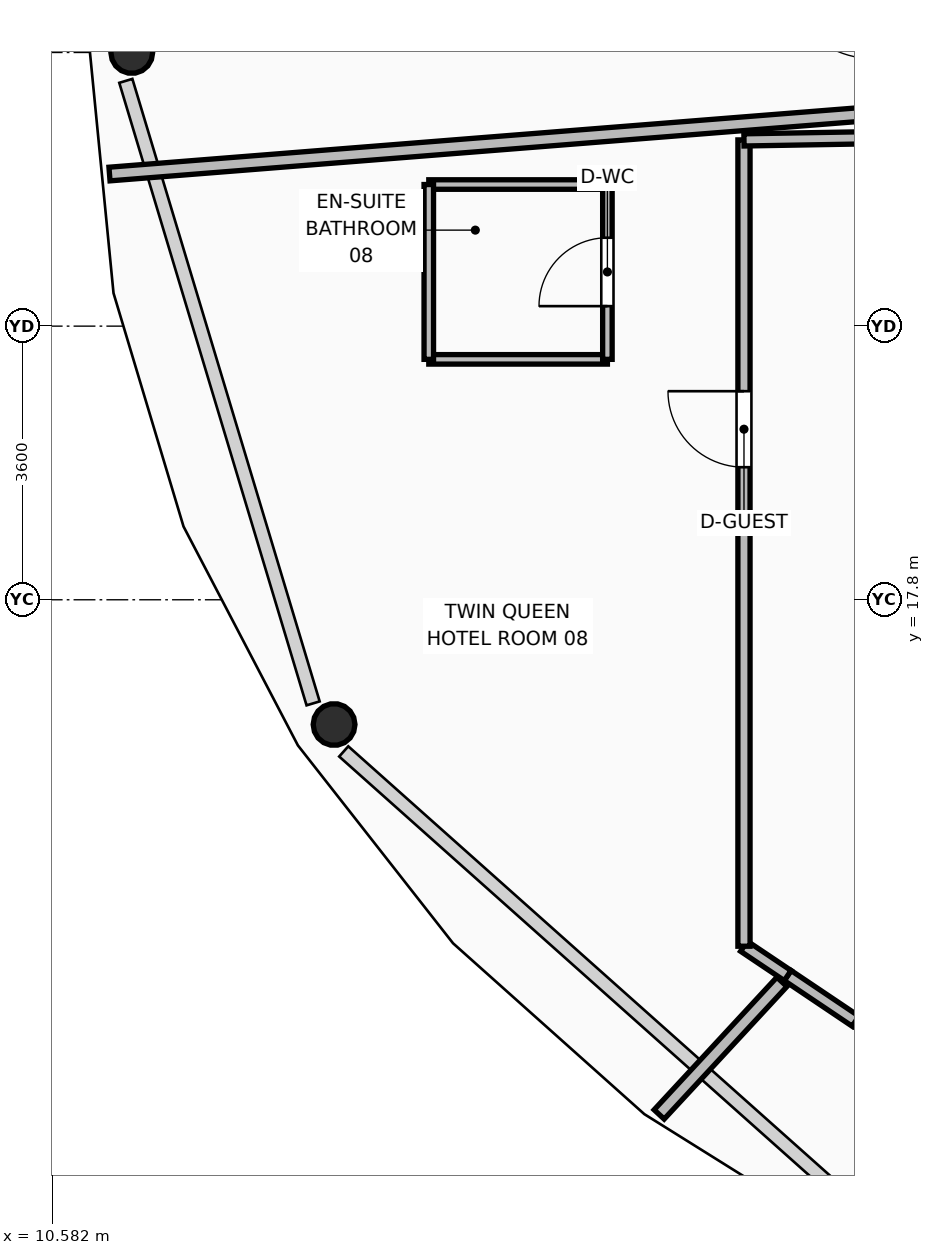
"""IFC4 building model, lengths in metres.
Left out: names, types, materials, properties, quantities, classifications, styles, units other than length and angle.
Written with IfcOpenShell. Run it as: python <this file> out.ifc"""

import sys

from ifc_helpers import new_model, si_unit, direction, frame, frame_2d, origin, origin_2d, place, context, subcontext, project, spatial, rectangle, hollow_circle, extrude, element, fill, save


model = new_model("IFC4")
c1 = context("Model", 3, precision=1e-05, world=origin(), true_north=direction((0.0, 1.0)))
c2 = subcontext(c1, "Body", "Model", "MODEL_VIEW")
j1 = project(units=[si_unit("LENGTHUNIT", "METRE"), si_unit("PLANEANGLEUNIT", "RADIAN")], contexts=[c1])
p1 = place(None, origin())
s1 = spatial("IfcSite", under=j1, at=p1, CompositionType="ELEMENT")
p2 = place(p1, origin())
s2 = spatial("IfcBuilding", under=s1, at=p2, CompositionType="ELEMENT")
p3 = place(p2, frame((0.0, 0.0, 263.85)))
s3 = spatial("IfcBuildingStorey", under=s2, at=p3, CompositionType="ELEMENT", Elevation=263.85)
p4 = place(p3, frame((11.63, 25.0, 0.0), z_axis=(0.022426310188, 0.0, 0.999748498679), x_axis=(0.0, 1.0, 0.0)))
e1 = element("IfcColumn", 1, at=p4, inside=s3, PredefinedType="COLUMN", context=c2, shape_type="SweptSolid", body=[
    extrude(hollow_circle(Radius=0.275, WallThickness=0.025, at=origin_2d()), origin(), (0.0, 0.0, 1.0), 3.571),
])
p5 = place(p3, frame((14.292, 16.159, 0.0), z_axis=(0.019349835531, 0.009845852708, 0.999764293746), x_axis=(-0.453501133358, 0.891255699585, 0.0)))
e2 = element("IfcColumn", 2, at=p5, inside=s3, PredefinedType="COLUMN", context=c2, shape_type="SweptSolid", body=[
    extrude(hollow_circle(Radius=0.275, WallThickness=0.025, at=origin_2d()), origin(), (0.0, 0.0, 1.0), 3.571),
])
p6 = place(p3, frame((21.153, 12.256, 0.0), z_axis=(0.0, 0.0, 1.0), x_axis=(-0.830125096925, 0.557577190581, 0.0)))
e3 = element("IfcWall", 3, at=p6, inside=s3, PredefinedType="PARTITIONING", context=c2, shape_type="SweptSolid", body=[
    extrude(rectangle(XDim=1.076, YDim=0.16, at=frame_2d((0.538, 0.0))), origin(), (0.0, 0.0, 1.0), 3.55),
])
p7 = place(p3, frame((20.26, 12.856, 0.0), z_axis=(0.0, 0.0, 1.0), x_axis=(-0.8302560917, 0.557382115065, 0.0)))
e4 = element("IfcWall", 4, at=p7, inside=s3, PredefinedType="PARTITIONING", context=c2, shape_type="SweptSolid", body=[
    extrude(rectangle(XDim=0.692, YDim=0.16, at=frame_2d((0.346, 0.0))), origin(), (0.0, 0.0, 1.0), 3.55),
])
p8 = place(p3, frame((19.685, 13.242, 0.0), z_axis=(0.0, 0.0, 1.0), x_axis=(0.0, 1.0, 0.0)))
e5 = element("IfcWall", 5, at=p8, inside=s3, PredefinedType="PARTITIONING", context=c2, shape_type="SweptSolid", body=[
    extrude(rectangle(XDim=10.608, YDim=0.16, at=frame_2d((5.304, 0.0))), origin(), (0.0, 0.0, 1.0), 3.132),
])
p9 = place(p8, frame((6.302, 0.0, 0.0)))
e6 = element("IfcOpeningElement", 6, at=p9, cuts=e5, PredefinedType="OPENING", context=c2, shape_type="SweptSolid", body=[
    extrude(rectangle(XDim=1.0, YDim=2.1, at=frame_2d((0.5, 1.05))), frame((0.0, 0.09, 0.0), z_axis=(0.0, -1.0, 0.0), x_axis=(1.0, 0.0, 0.0)), (0.0, 0.0, 1.0), 0.18),
])
p10 = place(p3, frame((19.685, 23.85, 0.0), z_axis=(0.0, 0.0, 1.0), x_axis=(0.999852179606, 0.017193572529, 0.0)))
e7 = element("IfcWall", 7, at=p10, inside=s3, PredefinedType="PARTITIONING", context=c2, shape_type="SweptSolid", body=[
    extrude(rectangle(XDim=1.86, YDim=0.16, at=frame_2d((0.93, 0.0))), origin(), (0.0, 0.0, 1.0), 2.595),
])
p11 = place(p3, frame((21.65, 24.219, 0.0), z_axis=(0.0, 0.0, 1.0), x_axis=(-0.996868257598, -0.079080193438, 0.0)))
e8 = element("IfcWall", 8, at=p11, inside=s3, PredefinedType="PARTITIONING", context=c2, shape_type="SweptSolid", body=[
    extrude(rectangle(XDim=10.345, YDim=0.18, at=frame_2d((5.173, 0.0))), origin(), (0.0, 0.0, 1.0), 2.595),
])
p12 = place(p3, frame((20.184, 12.773, 0.0), z_axis=(0.0, 0.0, 1.0), x_axis=(-0.679469476933, -0.733703775318, 0.0)))
e9 = element("IfcWall", 9, at=p12, inside=s3, PredefinedType="PARTITIONING", context=c2, shape_type="SweptSolid", body=[
    extrude(rectangle(XDim=2.377, YDim=0.18, at=frame_2d((1.188, 0.0))), origin(), (0.0, 0.0, 1.0), 3.003),
])
p13 = place(p3, frame((15.538, 20.963, 0.0), z_axis=(0.0, 0.0, 1.0), x_axis=(1.0, 0.0, 0.0)))
e10 = element("IfcWall", 10, at=p13, inside=s3, PredefinedType="PARTITIONING", context=c2, shape_type="SweptSolid", body=[
    extrude(rectangle(XDim=2.35, YDim=0.125, at=frame_2d((1.175, 0.0))), origin(), (0.0, 0.0, 1.0), 3.55),
])
p14 = place(p3, frame((15.538, 23.263, 0.0), z_axis=(0.0, 0.0, 1.0), x_axis=(1.0, 0.0, 0.0)))
e11 = element("IfcWall", 11, at=p14, inside=s3, PredefinedType="PARTITIONING", context=c2, shape_type="SweptSolid", body=[
    extrude(rectangle(XDim=2.35, YDim=0.125, at=frame_2d((1.175, 0.0))), origin(), (0.0, 0.0, 1.0), 3.132),
])
p15 = place(p3, frame((15.538, 20.963, 0.0), z_axis=(0.0, 0.0, 1.0), x_axis=(0.0, 1.0, 0.0)))
e12 = element("IfcWall", 12, at=p15, inside=s3, PredefinedType="PARTITIONING", context=c2, shape_type="SweptSolid", body=[
    extrude(rectangle(XDim=2.3, YDim=0.125, at=frame_2d((1.15, 0.0))), origin(), (0.0, 0.0, 1.0), 3.132),
])
p16 = place(p3, frame((17.888, 20.963, 0.0), z_axis=(0.0, 0.0, 1.0), x_axis=(0.0, 1.0, 0.0)))
e13 = element("IfcWall", 13, at=p16, inside=s3, PredefinedType="PARTITIONING", context=c2, shape_type="SweptSolid", body=[
    extrude(rectangle(XDim=2.3, YDim=0.125, at=frame_2d((1.15, 0.0))), origin(), (0.0, 0.0, 1.0), 3.132),
])
p17 = place(p16, frame((0.7, 0.0, 0.0)))
e14 = element("IfcOpeningElement", 14, at=p17, cuts=e13, PredefinedType="OPENING", context=c2, shape_type="SweptSolid", body=[
    extrude(rectangle(XDim=0.9, YDim=2.1, at=frame_2d((0.45, 1.05))), frame((0.0, 0.073, 0.0), z_axis=(0.0, -1.0, 0.0), x_axis=(1.0, 0.0, 0.0)), (0.0, 0.0, 1.0), 0.145),
])
p18 = place(p17, origin())
e15 = element("IfcDoor", 15, at=p18, inside=s3, OperationType="SINGLE_SWING_LEFT", PredefinedType="DOOR", context=c2, shape_type="SweptSolid", body=[
    extrude(rectangle(XDim=0.9, YDim=2.1, at=frame_2d((0.45, 1.05))), frame((0.0, 0.025, 0.0), z_axis=(0.0, -1.0, 0.0), x_axis=(1.0, 0.0, 0.0)), (0.0, 0.0, 1.0), 0.05),
])
fill(e14, e15)
p19 = place(p9, origin())
e16 = element("IfcDoor", 16, at=p19, inside=s3, OperationType="SINGLE_SWING_RIGHT", PredefinedType="DOOR", context=c2, shape_type="SweptSolid", body=[
    extrude(rectangle(XDim=1.0, YDim=2.1, at=frame_2d((0.5, 1.05))), frame((0.0, 0.025, 0.0), z_axis=(0.0, -1.0, 0.0), x_axis=(1.0, 0.0, 0.0)), (0.0, 0.0, 1.0), 0.05),
])
fill(e6, e16)
save(model, sys.argv[1])
